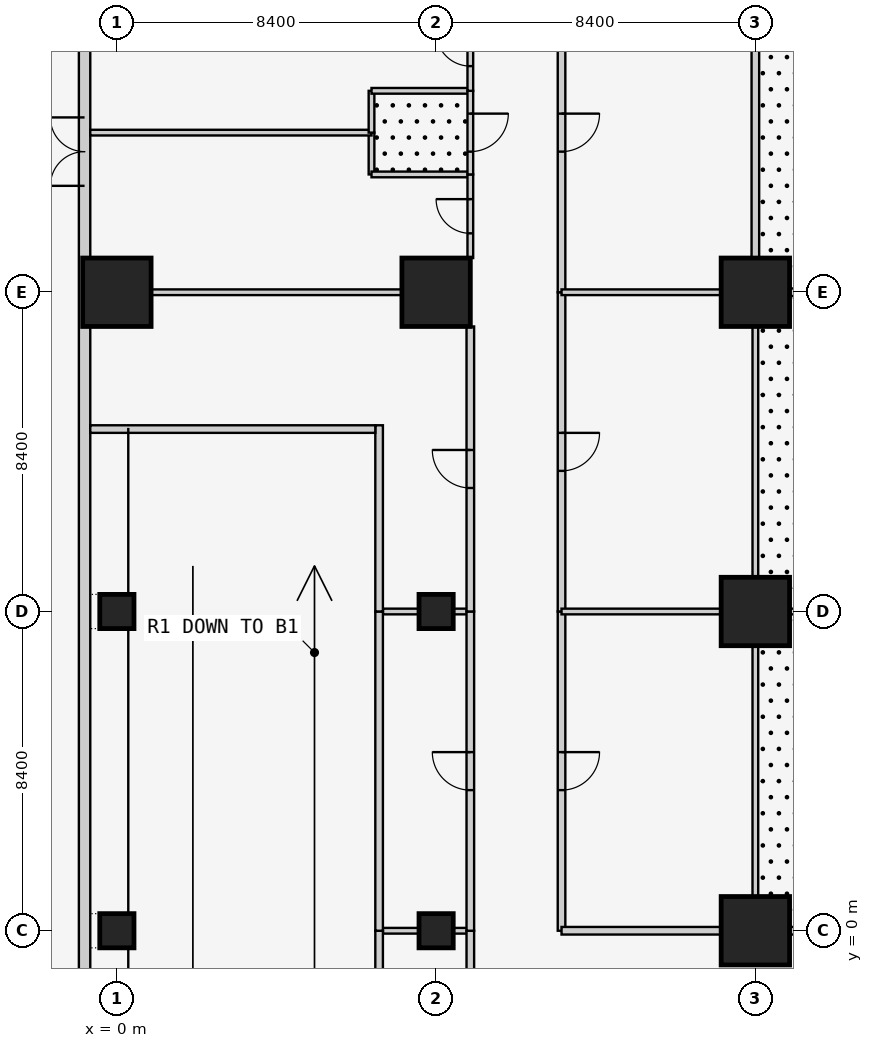
"""IFC4 building model, lengths in metres.
Left out: names, types, materials, properties, quantities, classifications, styles, units other than length and angle.
Written with IfcOpenShell. Run it as: python <this file> out.ifc"""

import sys

from ifc_helpers import new_model, si_unit, direction, frame, frame_2d, origin, origin_2d, place, context, subcontext, project, spatial, rectangle, extrude, element, fill, save


model = new_model("IFC4")
c1 = context("Model", 3, precision=1e-05, world=origin(), true_north=direction((0.0, 1.0)))
c2 = subcontext(c1, "Body", "Model", "MODEL_VIEW")
j1 = project(units=[si_unit("LENGTHUNIT", "METRE"), si_unit("PLANEANGLEUNIT", "RADIAN")], contexts=[c1])
p1 = place(None, origin())
s1 = spatial("IfcSite", under=j1, at=p1, CompositionType="ELEMENT")
p2 = place(p1, origin())
s2 = spatial("IfcBuilding", under=s1, at=p2, CompositionType="ELEMENT")
p3 = place(p2, origin())
s3 = spatial("IfcBuildingStorey", under=s2, at=p3, CompositionType="ELEMENT", Elevation=0.0)
for number, where, z_axis, x_axis in (
    (1, (0.0, 0.0, 0.0), (0.0, 0.0, 1.0), (1.0, 0.0, 0.0)),
    (2, (0.0, 8.4, 0.0), (0.0, 0.0, 1.0), (1.0, 0.0, 0.0)),
):
    element("IfcColumn", number, at=place(p3, frame(where, z_axis=z_axis, x_axis=x_axis)), inside=s3, PredefinedType="COLUMN", context=c2, shape_type="SweptSolid", body=[
        extrude(rectangle(XDim=0.9, YDim=0.9, at=origin_2d()), origin(), (0.0, 0.0, 1.0), 6.0),
    ])
p4 = place(p3, frame((0.0, 16.8, 0.0), z_axis=(0.0, 0.0, 1.0), x_axis=(1.0, 0.0, 0.0)))
e3 = element("IfcColumn", 3, at=p4, inside=s3, PredefinedType="COLUMN", context=c2, shape_type="SweptSolid", body=[
    extrude(rectangle(XDim=1.8, YDim=1.8, at=origin_2d()), origin(), (0.0, 0.0, 1.0), 6.0),
])
for number, where, z_axis, x_axis in (
    (4, (8.4, 0.0, 0.0), (0.0, 0.0, 1.0), (1.0, 0.0, 0.0)),
    (5, (8.4, 8.4, 0.0), (0.0, 0.0, 1.0), (1.0, 0.0, 0.0)),
):
    element("IfcColumn", number, at=place(p3, frame(where, z_axis=z_axis, x_axis=x_axis)), inside=s3, PredefinedType="COLUMN", context=c2, shape_type="SweptSolid", body=[
        extrude(rectangle(XDim=0.9, YDim=0.9, at=origin_2d()), origin(), (0.0, 0.0, 1.0), 6.0),
    ])
for number, where, z_axis, x_axis in (
    (6, (8.4, 16.8, 0.0), (0.0, 0.0, 1.0), (1.0, 0.0, 0.0)),
    (7, (16.8, 0.0, 0.0), (0.0, 0.0, 1.0), (1.0, 0.0, 0.0)),
    (8, (16.8, 8.4, 0.0), (0.0, 0.0, 1.0), (1.0, 0.0, 0.0)),
    (9, (16.8, 16.8, 0.0), (0.0, 0.0, 1.0), (1.0, 0.0, 0.0)),
):
    element("IfcColumn", number, at=place(p3, frame(where, z_axis=z_axis, x_axis=x_axis)), inside=s3, PredefinedType="COLUMN", context=c2, shape_type="SweptSolid", body=[
        extrude(rectangle(XDim=1.8, YDim=1.8, at=origin_2d()), origin(), (0.0, 0.0, 1.0), 6.0),
    ])
p5 = place(p3, frame((-0.85, 58.4, 0.0), z_axis=(0.0, 0.0, 1.0), x_axis=(0.0, -1.0, 0.0)))
e10 = element("IfcWall", 10, at=p5, inside=s3, PredefinedType="SOLIDWALL", context=c2, shape_type="SweptSolid", body=[
    extrude(rectangle(XDim=74.8, YDim=0.3, at=frame_2d((37.4, 0.0))), origin(), (0.0, 0.0, 1.0), 5.8),
])
p6 = place(p5, frame((68.0, 0.0, 0.0)))
e11 = element("IfcOpeningElement", 11, at=p6, cuts=e10, PredefinedType="OPENING", context=c2, shape_type="SweptSolid", body=[
    extrude(rectangle(XDim=1.8, YDim=2.4, at=frame_2d((0.9, 1.2))), frame((0.0, 0.16, 0.0), z_axis=(0.0, -1.0, 0.0), x_axis=(1.0, 0.0, 0.0)), (0.0, 0.0, 1.0), 0.32),
])
p7 = place(p5, frame((37.0, 0.0, 0.0)))
e12 = element("IfcOpeningElement", 12, at=p7, cuts=e10, PredefinedType="OPENING", context=c2, shape_type="SweptSolid", body=[
    extrude(rectangle(XDim=1.8, YDim=2.4, at=frame_2d((0.9, 1.2))), frame((0.0, 0.16, 0.0), z_axis=(0.0, -1.0, 0.0), x_axis=(1.0, 0.0, 0.0)), (0.0, 0.0, 1.0), 0.32),
])
p8 = place(p5, frame((11.0, 0.0, 0.0)))
e13 = element("IfcOpeningElement", 13, at=p8, cuts=e10, PredefinedType="OPENING", context=c2, shape_type="SweptSolid", body=[
    extrude(rectangle(XDim=1.8, YDim=2.4, at=frame_2d((0.9, 1.2))), frame((0.0, 0.16, 0.0), z_axis=(0.0, -1.0, 0.0), x_axis=(1.0, 0.0, 0.0)), (0.0, 0.0, 1.0), 0.32),
])
p9 = place(p3, frame((6.7, 21.0, 0.0), z_axis=(0.0, 0.0, 1.0), x_axis=(0.0, -1.0, 0.0)))
e14 = element("IfcWall", 14, at=p9, inside=s3, PredefinedType="PARTITIONING", context=c2, shape_type="SweptSolid", body=[
    extrude(rectangle(XDim=1.1, YDim=0.15, at=frame_2d((0.55, 0.0))), origin(), (0.0, 0.0, 1.0), 5.8),
])
p10 = place(p3, frame((6.7, 19.9, 0.0), z_axis=(0.0, 0.0, 1.0), x_axis=(1.0, 0.0, 0.0)))
e15 = element("IfcWall", 15, at=p10, inside=s3, PredefinedType="PARTITIONING", context=c2, shape_type="SweptSolid", body=[
    extrude(rectangle(XDim=2.6, YDim=0.15, at=frame_2d((1.3, 0.0))), origin(), (0.0, 0.0, 1.0), 5.8),
])
p11 = place(p3, frame((-0.7, 21.0, 0.0), z_axis=(0.0, 0.0, 1.0), x_axis=(1.0, 0.0, 0.0)))
e16 = element("IfcWall", 16, at=p11, inside=s3, PredefinedType="PARTITIONING", context=c2, shape_type="SweptSolid", body=[
    extrude(rectangle(XDim=7.4, YDim=0.15, at=frame_2d((3.7, 0.0))), origin(), (0.0, 0.0, 1.0), 5.8),
])
p12 = place(p3, frame((7.5, 16.8, 0.0), z_axis=(0.0, 0.0, 1.0), x_axis=(-1.0, 0.0, 0.0)))
e17 = element("IfcWall", 17, at=p12, inside=s3, PredefinedType="PARTITIONING", context=c2, shape_type="SweptSolid", body=[
    extrude(rectangle(XDim=6.6, YDim=0.15, at=frame_2d((3.3, 0.0))), origin(), (0.0, 0.0, 1.0), 5.043),
])
p13 = place(p3, frame((9.3, 19.9, 0.0), z_axis=(0.0, 0.0, 1.0), x_axis=(0.0, -1.0, 0.0)))
e18 = element("IfcWall", 18, at=p13, inside=s3, PredefinedType="PARTITIONING", context=c2, shape_type="SweptSolid", body=[
    extrude(rectangle(XDim=2.2, YDim=0.15, at=frame_2d((1.1, 0.0))), origin(), (0.0, 0.0, 1.0), 5.8),
])
p14 = place(p13, frame((0.65, 0.0, 0.0)))
e19 = element("IfcOpeningElement", 19, at=p14, cuts=e18, PredefinedType="OPENING", context=c2, shape_type="SweptSolid", body=[
    extrude(rectangle(XDim=0.9, YDim=2.1, at=frame_2d((0.45, 1.05))), frame((0.0, 0.085, 0.0), z_axis=(0.0, -1.0, 0.0), x_axis=(1.0, 0.0, 0.0)), (0.0, 0.0, 1.0), 0.17),
])
p15 = place(p3, frame((6.7, 21.0, 0.0), z_axis=(0.0, 0.0, 1.0), x_axis=(0.0, 1.0, 0.0)))
e20 = element("IfcWall", 20, at=p15, inside=s3, PredefinedType="PARTITIONING", context=c2, shape_type="SweptSolid", body=[
    extrude(rectangle(XDim=1.1, YDim=0.15, at=frame_2d((0.55, 0.0))), origin(), (0.0, 0.0, 1.0), 5.8),
])
p16 = place(p3, frame((6.7, 22.1, 0.0), z_axis=(0.0, 0.0, 1.0), x_axis=(1.0, 0.0, 0.0)))
e21 = element("IfcWall", 21, at=p16, inside=s3, PredefinedType="PARTITIONING", context=c2, shape_type="SweptSolid", body=[
    extrude(rectangle(XDim=2.6, YDim=0.15, at=frame_2d((1.3, 0.0))), origin(), (0.0, 0.0, 1.0), 5.8),
])
p17 = place(p3, frame((9.3, 22.1, 0.0), z_axis=(0.0, 0.0, 1.0), x_axis=(0.0, -1.0, 0.0)))
e22 = element("IfcWall", 22, at=p17, inside=s3, PredefinedType="PARTITIONING", context=c2, shape_type="SweptSolid", body=[
    extrude(rectangle(XDim=2.2, YDim=0.15, at=frame_2d((1.1, 0.0))), origin(), (0.0, 0.0, 1.0), 5.8),
])
p18 = place(p17, frame((0.6, 0.0, 0.0)))
e23 = element("IfcOpeningElement", 23, at=p18, cuts=e22, PredefinedType="OPENING", context=c2, shape_type="SweptSolid", body=[
    extrude(rectangle(XDim=1.0, YDim=2.1, at=frame_2d((0.5, 1.05))), frame((0.0, 0.085, 0.0), z_axis=(0.0, -1.0, 0.0), x_axis=(1.0, 0.0, 0.0)), (0.0, 0.0, 1.0), 0.17),
])
p19 = place(p3, frame((9.3, 24.3, 0.0), z_axis=(0.0, 0.0, 1.0), x_axis=(0.0, -1.0, 0.0)))
e24 = element("IfcWall", 24, at=p19, inside=s3, PredefinedType="PARTITIONING", context=c2, shape_type="SweptSolid", body=[
    extrude(rectangle(XDim=2.2, YDim=0.15, at=frame_2d((1.1, 0.0))), origin(), (0.0, 0.0, 1.0), 5.8),
])
p20 = place(p19, frame((0.65, 0.0, 0.0)))
e25 = element("IfcOpeningElement", 25, at=p20, cuts=e24, PredefinedType="OPENING", context=c2, shape_type="SweptSolid", body=[
    extrude(rectangle(XDim=0.9, YDim=2.1, at=frame_2d((0.45, 1.05))), frame((0.0, 0.085, 0.0), z_axis=(0.0, -1.0, 0.0), x_axis=(1.0, 0.0, 0.0)), (0.0, 0.0, 1.0), 0.17),
])
p21 = place(p3, frame((7.0, 0.0, 0.0), z_axis=(0.0, 0.0, 1.0), x_axis=(1.0, 0.0, 0.0)))
e26 = element("IfcWall", 26, at=p21, inside=s3, PredefinedType="PARTITIONING", context=c2, shape_type="SweptSolid", body=[
    extrude(rectangle(XDim=0.95, YDim=0.15, at=frame_2d((0.475, 0.0))), origin(), (0.0, 0.0, 1.0), 5.043),
])
p22 = place(p3, frame((8.85, 0.0, 0.0), z_axis=(0.0, 0.0, 1.0), x_axis=(1.0, 0.0, 0.0)))
e27 = element("IfcWall", 27, at=p22, inside=s3, PredefinedType="PARTITIONING", context=c2, shape_type="SweptSolid", body=[
    extrude(rectangle(XDim=0.45, YDim=0.15, at=frame_2d((0.225, 0.0))), origin(), (0.0, 0.0, 1.0), 5.043),
])
p23 = place(p3, frame((6.9, -8.4, 0.0), z_axis=(0.0, 0.0, 1.0), x_axis=(0.0, 1.0, 0.0)))
e28 = element("IfcWall", 28, at=p23, inside=s3, PredefinedType="PARTITIONING", context=c2, shape_type="SweptSolid", body=[
    extrude(rectangle(XDim=8.4, YDim=0.2, at=frame_2d((4.2, 0.0))), origin(), (0.0, 0.0, 1.0), 5.8),
])
p24 = place(p3, frame((9.3, 0.0, 0.0), z_axis=(0.0, 0.0, 1.0), x_axis=(0.0, -1.0, 0.0)))
e29 = element("IfcWall", 29, at=p24, inside=s3, PredefinedType="PARTITIONING", context=c2, shape_type="SweptSolid", body=[
    extrude(rectangle(XDim=8.4, YDim=0.2, at=frame_2d((4.2, 0.0))), origin(), (0.0, 0.0, 1.0), 5.8),
])
p25 = place(p24, frame((3.7, 0.0, 0.0)))
e30 = element("IfcOpeningElement", 30, at=p25, cuts=e29, PredefinedType="OPENING", context=c2, shape_type="SweptSolid", body=[
    extrude(rectangle(XDim=1.0, YDim=2.1, at=frame_2d((0.5, 1.05))), frame((0.0, 0.11, 0.0), z_axis=(0.0, -1.0, 0.0), x_axis=(1.0, 0.0, 0.0)), (0.0, 0.0, 1.0), 0.22),
])
p26 = place(p3, frame((7.0, 8.4, 0.0), z_axis=(0.0, 0.0, 1.0), x_axis=(1.0, 0.0, 0.0)))
e31 = element("IfcWall", 31, at=p26, inside=s3, PredefinedType="PARTITIONING", context=c2, shape_type="SweptSolid", body=[
    extrude(rectangle(XDim=0.95, YDim=0.15, at=frame_2d((0.475, 0.0))), origin(), (0.0, 0.0, 1.0), 5.043),
])
p27 = place(p3, frame((8.85, 8.4, 0.0), z_axis=(0.0, 0.0, 1.0), x_axis=(1.0, 0.0, 0.0)))
e32 = element("IfcWall", 32, at=p27, inside=s3, PredefinedType="PARTITIONING", context=c2, shape_type="SweptSolid", body=[
    extrude(rectangle(XDim=0.45, YDim=0.15, at=frame_2d((0.225, 0.0))), origin(), (0.0, 0.0, 1.0), 5.043),
])
p28 = place(p3, frame((6.9, 0.0, 0.0), z_axis=(0.0, 0.0, 1.0), x_axis=(0.0, 1.0, 0.0)))
e33 = element("IfcWall", 33, at=p28, inside=s3, PredefinedType="PARTITIONING", context=c2, shape_type="SweptSolid", body=[
    extrude(rectangle(XDim=8.4, YDim=0.2, at=frame_2d((4.2, 0.0))), origin(), (0.0, 0.0, 1.0), 5.8),
])
p29 = place(p3, frame((9.3, 8.4, 0.0), z_axis=(0.0, 0.0, 1.0), x_axis=(0.0, -1.0, 0.0)))
e34 = element("IfcWall", 34, at=p29, inside=s3, PredefinedType="PARTITIONING", context=c2, shape_type="SweptSolid", body=[
    extrude(rectangle(XDim=8.4, YDim=0.2, at=frame_2d((4.2, 0.0))), origin(), (0.0, 0.0, 1.0), 5.8),
])
p30 = place(p29, frame((3.7, 0.0, 0.0)))
e35 = element("IfcOpeningElement", 35, at=p30, cuts=e34, PredefinedType="OPENING", context=c2, shape_type="SweptSolid", body=[
    extrude(rectangle(XDim=1.0, YDim=2.1, at=frame_2d((0.5, 1.05))), frame((0.0, 0.11, 0.0), z_axis=(0.0, -1.0, 0.0), x_axis=(1.0, 0.0, 0.0)), (0.0, 0.0, 1.0), 0.22),
])
p31 = place(p3, frame((6.9, 8.4, 0.0), z_axis=(0.0, 0.0, 1.0), x_axis=(0.0, 1.0, 0.0)))
e36 = element("IfcWall", 36, at=p31, inside=s3, PredefinedType="PARTITIONING", context=c2, shape_type="SweptSolid", body=[
    extrude(rectangle(XDim=4.9, YDim=0.2, at=frame_2d((2.45, 0.0))), origin(), (0.0, 0.0, 1.0), 5.8),
])
p32 = place(p3, frame((6.8, 13.2, 0.0), z_axis=(0.0, 0.0, 1.0), x_axis=(-1.0, 0.0, 0.0)))
e37 = element("IfcWall", 37, at=p32, inside=s3, PredefinedType="PARTITIONING", context=c2, shape_type="SweptSolid", body=[
    extrude(rectangle(XDim=7.5, YDim=0.2, at=frame_2d((3.75, 0.0))), origin(), (0.0, 0.0, 1.0), 5.8),
])
p33 = place(p3, frame((9.3, 15.9, 0.0), z_axis=(0.0, 0.0, 1.0), x_axis=(0.0, -1.0, 0.0)))
e38 = element("IfcWall", 38, at=p33, inside=s3, PredefinedType="PARTITIONING", context=c2, shape_type="SweptSolid", body=[
    extrude(rectangle(XDim=7.5, YDim=0.2, at=frame_2d((3.75, 0.0))), origin(), (0.0, 0.0, 1.0), 5.8),
])
p34 = place(p33, frame((3.25, 0.0, 0.0)))
e39 = element("IfcOpeningElement", 39, at=p34, cuts=e38, PredefinedType="OPENING", context=c2, shape_type="SweptSolid", body=[
    extrude(rectangle(XDim=1.0, YDim=2.1, at=frame_2d((0.5, 1.05))), frame((0.0, 0.11, 0.0), z_axis=(0.0, -1.0, 0.0), x_axis=(1.0, 0.0, 0.0)), (0.0, 0.0, 1.0), 0.22),
])
p35 = place(p3, frame((11.7, 8.4, 0.0), z_axis=(0.0, 0.0, 1.0), x_axis=(0.0, -1.0, 0.0)))
e40 = element("IfcWall", 40, at=p35, inside=s3, PredefinedType="PARTITIONING", context=c2, shape_type="SweptSolid", body=[
    extrude(rectangle(XDim=8.4, YDim=0.2, at=frame_2d((4.2, 0.0))), origin(), (0.0, 0.0, 1.0), 5.8),
])
p36 = place(p35, frame((3.7, 0.0, 0.0)))
e41 = element("IfcOpeningElement", 41, at=p36, cuts=e40, PredefinedType="OPENING", context=c2, shape_type="SweptSolid", body=[
    extrude(rectangle(XDim=1.0, YDim=2.1, at=frame_2d((0.5, 1.05))), frame((0.0, 0.11, 0.0), z_axis=(0.0, -1.0, 0.0), x_axis=(1.0, 0.0, 0.0)), (0.0, 0.0, 1.0), 0.22),
])
p37 = place(p3, frame((11.7, 0.0, 0.0), z_axis=(0.0, 0.0, 1.0), x_axis=(1.0, 0.0, 0.0)))
e42 = element("IfcWall", 42, at=p37, inside=s3, PredefinedType="PARTITIONING", context=c2, shape_type="SweptSolid", body=[
    extrude(rectangle(XDim=4.2, YDim=0.2, at=frame_2d((2.1, 0.0))), origin(), (0.0, 0.0, 1.0), 5.043),
])
p38 = place(p3, frame((17.7, 0.0, 0.0), z_axis=(0.0, 0.0, 1.0), x_axis=(1.0, 0.0, 0.0)))
e43 = element("IfcWall", 43, at=p38, inside=s3, PredefinedType="PARTITIONING", context=c2, shape_type="SweptSolid", body=[
    extrude(rectangle(XDim=6.6, YDim=0.2, at=frame_2d((3.3, 0.0))), origin(), (0.0, 0.0, 1.0), 5.043),
])
p39 = place(p38, frame((0.3, 0.0, 0.0)))
e44 = element("IfcOpeningElement", 44, at=p39, cuts=e43, PredefinedType="OPENING", context=c2, shape_type="SweptSolid", body=[
    extrude(rectangle(XDim=1.8, YDim=2.4, at=frame_2d((0.9, 1.2))), frame((0.0, 0.11, 0.0), z_axis=(0.0, -1.0, 0.0), x_axis=(1.0, 0.0, 0.0)), (0.0, 0.0, 1.0), 0.22),
])
p40 = place(p3, frame((11.7, 16.8, 0.0), z_axis=(0.0, 0.0, 1.0), x_axis=(0.0, -1.0, 0.0)))
e45 = element("IfcWall", 45, at=p40, inside=s3, PredefinedType="PARTITIONING", context=c2, shape_type="SweptSolid", body=[
    extrude(rectangle(XDim=8.4, YDim=0.2, at=frame_2d((4.2, 0.0))), origin(), (0.0, 0.0, 1.0), 5.8),
])
p41 = place(p40, frame((3.7, 0.0, 0.0)))
e46 = element("IfcOpeningElement", 46, at=p41, cuts=e45, PredefinedType="OPENING", context=c2, shape_type="SweptSolid", body=[
    extrude(rectangle(XDim=1.0, YDim=2.1, at=frame_2d((0.5, 1.05))), frame((0.0, 0.11, 0.0), z_axis=(0.0, -1.0, 0.0), x_axis=(1.0, 0.0, 0.0)), (0.0, 0.0, 1.0), 0.22),
])
p42 = place(p3, frame((11.7, 25.2, 0.0), z_axis=(0.0, 0.0, 1.0), x_axis=(0.0, -1.0, 0.0)))
e47 = element("IfcWall", 47, at=p42, inside=s3, PredefinedType="PARTITIONING", context=c2, shape_type="SweptSolid", body=[
    extrude(rectangle(XDim=8.4, YDim=0.2, at=frame_2d((4.2, 0.0))), origin(), (0.0, 0.0, 1.0), 5.8),
])
p43 = place(p42, frame((3.7, 0.0, 0.0)))
e48 = element("IfcOpeningElement", 48, at=p43, cuts=e47, PredefinedType="OPENING", context=c2, shape_type="SweptSolid", body=[
    extrude(rectangle(XDim=1.0, YDim=2.1, at=frame_2d((0.5, 1.05))), frame((0.0, 0.11, 0.0), z_axis=(0.0, -1.0, 0.0), x_axis=(1.0, 0.0, 0.0)), (0.0, 0.0, 1.0), 0.22),
])
p44 = place(p3, frame((24.3, 16.8, 0.0), z_axis=(0.0, 0.0, 1.0), x_axis=(-1.0, 0.0, 0.0)))
e49 = element("IfcWall", 49, at=p44, inside=s3, PredefinedType="PARTITIONING", context=c2, shape_type="SweptSolid", body=[
    extrude(rectangle(XDim=6.6, YDim=0.2, at=frame_2d((3.3, 0.0))), origin(), (0.0, 0.0, 1.0), 5.043),
])
p45 = place(p44, frame((4.5, 0.0, 0.0)))
e50 = element("IfcOpeningElement", 50, at=p45, cuts=e49, PredefinedType="OPENING", context=c2, shape_type="SweptSolid", body=[
    extrude(rectangle(XDim=1.8, YDim=2.4, at=frame_2d((0.9, 1.2))), frame((0.0, 0.11, 0.0), z_axis=(0.0, -1.0, 0.0), x_axis=(1.0, 0.0, 0.0)), (0.0, 0.0, 1.0), 0.22),
])
p46 = place(p3, frame((16.8, 17.7, 0.0), z_axis=(0.0, 0.0, 1.0), x_axis=(0.0, 1.0, 0.0)))
e51 = element("IfcWall", 51, at=p46, inside=s3, PredefinedType="PARTITIONING", context=c2, shape_type="SweptSolid", body=[
    extrude(rectangle(XDim=6.6, YDim=0.2, at=frame_2d((3.3, 0.0))), origin(), (0.0, 0.0, 1.0), 5.043),
])
p47 = place(p3, frame((16.8, 7.5, 0.0), z_axis=(0.0, 0.0, 1.0), x_axis=(0.0, -1.0, 0.0)))
e52 = element("IfcWall", 52, at=p47, inside=s3, PredefinedType="PARTITIONING", context=c2, shape_type="SweptSolid", body=[
    extrude(rectangle(XDim=6.6, YDim=0.15, at=frame_2d((3.3, 0.0))), origin(), (0.0, 0.0, 1.0), 5.043),
])
p48 = place(p3, frame((11.7, 8.4, 0.0), z_axis=(0.0, 0.0, 1.0), x_axis=(1.0, 0.0, 0.0)))
e53 = element("IfcWall", 53, at=p48, inside=s3, PredefinedType="PARTITIONING", context=c2, shape_type="SweptSolid", body=[
    extrude(rectangle(XDim=4.2, YDim=0.15, at=frame_2d((2.1, 0.0))), origin(), (0.0, 0.0, 1.0), 5.043),
])
p49 = place(p3, frame((17.7, 8.4, 0.0), z_axis=(0.0, 0.0, 1.0), x_axis=(1.0, 0.0, 0.0)))
e54 = element("IfcWall", 54, at=p49, inside=s3, PredefinedType="PARTITIONING", context=c2, shape_type="SweptSolid", body=[
    extrude(rectangle(XDim=6.6, YDim=0.15, at=frame_2d((3.3, 0.0))), origin(), (0.0, 0.0, 1.0), 5.043),
])
p50 = place(p3, frame((16.8, 15.9, 0.0), z_axis=(0.0, 0.0, 1.0), x_axis=(0.0, -1.0, 0.0)))
e55 = element("IfcWall", 55, at=p50, inside=s3, PredefinedType="PARTITIONING", context=c2, shape_type="SweptSolid", body=[
    extrude(rectangle(XDim=6.6, YDim=0.15, at=frame_2d((3.3, 0.0))), origin(), (0.0, 0.0, 1.0), 5.043),
])
p51 = place(p3, frame((11.7, 16.8, 0.0), z_axis=(0.0, 0.0, 1.0), x_axis=(1.0, 0.0, 0.0)))
e56 = element("IfcWall", 56, at=p51, inside=s3, PredefinedType="PARTITIONING", context=c2, shape_type="SweptSolid", body=[
    extrude(rectangle(XDim=4.2, YDim=0.15, at=frame_2d((2.1, 0.0))), origin(), (0.0, 0.0, 1.0), 5.043),
])
p52 = place(p7, frame((1.8, 0.0, 0.0), z_axis=(0.0, 0.0, 1.0), x_axis=(-1.0, 0.0, 0.0)))
e57 = element("IfcDoor", 57, at=p52, inside=s3, OperationType="DOUBLE_DOOR_SINGLE_SWING", PredefinedType="DOOR", context=c2, shape_type="SweptSolid", body=[
    extrude(rectangle(XDim=1.8, YDim=2.4, at=frame_2d((0.9, 1.2))), frame((0.0, 0.025, 0.0), z_axis=(0.0, -1.0, 0.0), x_axis=(1.0, 0.0, 0.0)), (0.0, 0.0, 1.0), 0.05),
])
fill(e12, e57)
p53 = place(p14, frame((0.9, 0.0, 0.0), z_axis=(0.0, 0.0, 1.0), x_axis=(-1.0, 0.0, 0.0)))
e58 = element("IfcDoor", 58, at=p53, inside=s3, OperationType="SINGLE_SWING_RIGHT", PredefinedType="DOOR", context=c2, shape_type="SweptSolid", body=[
    extrude(rectangle(XDim=0.9, YDim=2.1, at=frame_2d((0.45, 1.05))), frame((0.0, 0.025, 0.0), z_axis=(0.0, -1.0, 0.0), x_axis=(1.0, 0.0, 0.0)), (0.0, 0.0, 1.0), 0.05),
])
fill(e19, e58)
p54 = place(p18, origin())
e59 = element("IfcDoor", 59, at=p54, inside=s3, OperationType="SINGLE_SWING_LEFT", PredefinedType="DOOR", context=c2, shape_type="SweptSolid", body=[
    extrude(rectangle(XDim=1.0, YDim=2.1, at=frame_2d((0.5, 1.05))), frame((0.0, 0.025, 0.0), z_axis=(0.0, -1.0, 0.0), x_axis=(1.0, 0.0, 0.0)), (0.0, 0.0, 1.0), 0.05),
])
fill(e23, e59)
p55 = place(p20, frame((0.9, 0.0, 0.0), z_axis=(0.0, 0.0, 1.0), x_axis=(-1.0, 0.0, 0.0)))
e60 = element("IfcDoor", 60, at=p55, inside=s3, OperationType="SINGLE_SWING_RIGHT", PredefinedType="DOOR", context=c2, shape_type="SweptSolid", body=[
    extrude(rectangle(XDim=0.9, YDim=2.1, at=frame_2d((0.45, 1.05))), frame((0.0, 0.025, 0.0), z_axis=(0.0, -1.0, 0.0), x_axis=(1.0, 0.0, 0.0)), (0.0, 0.0, 1.0), 0.05),
])
fill(e25, e60)
p56 = place(p30, frame((1.0, 0.0, 0.0), z_axis=(0.0, 0.0, 1.0), x_axis=(-1.0, 0.0, 0.0)))
e61 = element("IfcDoor", 61, at=p56, inside=s3, OperationType="SINGLE_SWING_RIGHT", PredefinedType="DOOR", context=c2, shape_type="SweptSolid", body=[
    extrude(rectangle(XDim=1.0, YDim=2.1, at=frame_2d((0.5, 1.05))), frame((0.0, 0.025, 0.0), z_axis=(0.0, -1.0, 0.0), x_axis=(1.0, 0.0, 0.0)), (0.0, 0.0, 1.0), 0.05),
])
fill(e35, e61)
p57 = place(p34, frame((1.0, 0.0, 0.0), z_axis=(0.0, 0.0, 1.0), x_axis=(-1.0, 0.0, 0.0)))
e62 = element("IfcDoor", 62, at=p57, inside=s3, OperationType="SINGLE_SWING_RIGHT", PredefinedType="DOOR", context=c2, shape_type="SweptSolid", body=[
    extrude(rectangle(XDim=1.0, YDim=2.1, at=frame_2d((0.5, 1.05))), frame((0.0, 0.025, 0.0), z_axis=(0.0, -1.0, 0.0), x_axis=(1.0, 0.0, 0.0)), (0.0, 0.0, 1.0), 0.05),
])
fill(e39, e62)
p58 = place(p36, origin())
e63 = element("IfcDoor", 63, at=p58, inside=s3, OperationType="SINGLE_SWING_LEFT", PredefinedType="DOOR", context=c2, shape_type="SweptSolid", body=[
    extrude(rectangle(XDim=1.0, YDim=2.1, at=frame_2d((0.5, 1.05))), frame((0.0, 0.025, 0.0), z_axis=(0.0, -1.0, 0.0), x_axis=(1.0, 0.0, 0.0)), (0.0, 0.0, 1.0), 0.05),
])
fill(e41, e63)
p59 = place(p41, origin())
e64 = element("IfcDoor", 64, at=p59, inside=s3, OperationType="SINGLE_SWING_LEFT", PredefinedType="DOOR", context=c2, shape_type="SweptSolid", body=[
    extrude(rectangle(XDim=1.0, YDim=2.1, at=frame_2d((0.5, 1.05))), frame((0.0, 0.025, 0.0), z_axis=(0.0, -1.0, 0.0), x_axis=(1.0, 0.0, 0.0)), (0.0, 0.0, 1.0), 0.05),
])
fill(e46, e64)
p60 = place(p43, origin())
e65 = element("IfcDoor", 65, at=p60, inside=s3, OperationType="SINGLE_SWING_LEFT", PredefinedType="DOOR", context=c2, shape_type="SweptSolid", body=[
    extrude(rectangle(XDim=1.0, YDim=2.1, at=frame_2d((0.5, 1.05))), frame((0.0, 0.025, 0.0), z_axis=(0.0, -1.0, 0.0), x_axis=(1.0, 0.0, 0.0)), (0.0, 0.0, 1.0), 0.05),
])
fill(e48, e65)
save(model, sys.argv[1])
